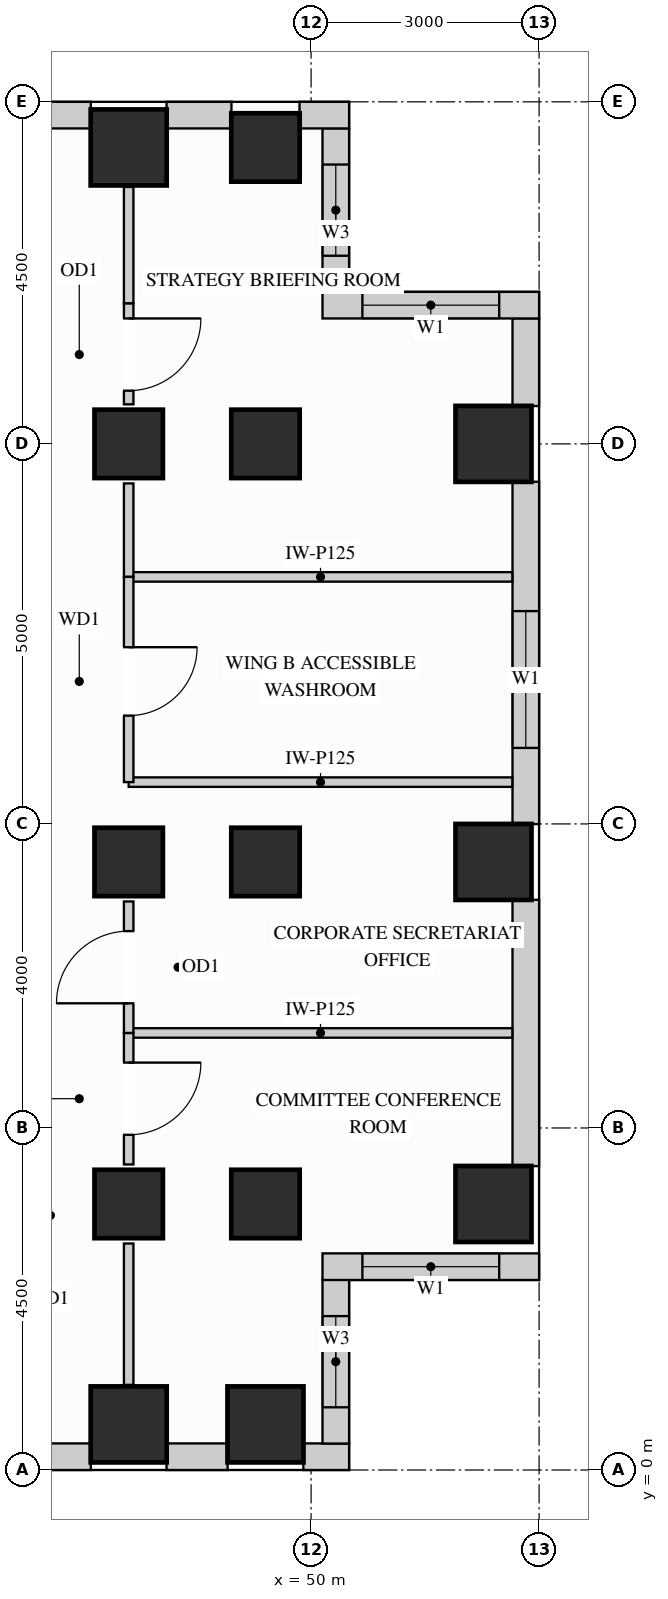
"""IFC4 building model, lengths in metres.
Left out: names, types, materials, properties, quantities, classifications, styles, units other than length and angle.
Written with IfcOpenShell. Run it as: python <this file> out.ifc"""

import sys

from ifc_helpers import new_model, si_unit, direction, frame, frame_2d, origin, origin_2d, place, context, subcontext, project, spatial, rectangle, extrude, source, transform, mapped, element, fill, save


model = new_model("IFC4")
c1 = context("Model", 3, precision=1e-05, world=origin(), true_north=direction((0.0, 1.0)))
c2 = subcontext(c1, "Body", "Model", "MODEL_VIEW")
j1 = project(units=[si_unit("LENGTHUNIT", "METRE"), si_unit("PLANEANGLEUNIT", "RADIAN")], contexts=[c1])
p1 = place(None, origin())
s1 = spatial("IfcSite", under=j1, at=p1, CompositionType="ELEMENT")
p2 = place(p1, origin())
s2 = spatial("IfcBuilding", under=s1, at=p2, CompositionType="ELEMENT")
p3 = place(p2, frame((0.0, 0.0, 153.9)))
s3 = spatial("IfcBuildingStorey", under=s2, at=p3, CompositionType="ELEMENT", Elevation=153.9)
m1 = source(origin(), c2, "Body", "SweptSolid", [
    extrude(rectangle(XDim=0.9, YDim=0.9, at=origin_2d()), origin(), (0.0, 0.0, 1.0), 3.4),
])
for number, where, z_axis, x_axis in (
    (1, (47.6, 13.5, 0.0), (0.0, 0.0, 1.0), (1.0, 0.0, 0.0)),
    (2, (47.6, 3.5, 0.0), (0.0, 0.0, 1.0), (1.0, 0.0, 0.0)),
    (3, (47.6, 8.0, 0.0), (0.0, 0.0, 1.0), (1.0, 0.0, 0.0)),
    (4, (49.4, 13.5, 0.0), (0.0, 0.0, 1.0), (1.0, 0.0, 0.0)),
    (5, (49.4, 17.4, 0.0), (0.0, 0.0, 1.0), (1.0, 0.0, 0.0)),
    (6, (49.4, 3.5, 0.0), (0.0, 0.0, 1.0), (1.0, 0.0, 0.0)),
    (7, (49.4, 8.0, 0.0), (0.0, 0.0, 1.0), (1.0, 0.0, 0.0)),
):
    element("IfcColumn", number, at=place(p3, frame(where, z_axis=z_axis, x_axis=x_axis)), inside=s3, PredefinedType="COLUMN", context=c2, shape_type="MappedRepresentation", body=[
        mapped(m1, transform((0.0, 0.0, 0.0), x_axis=(1.0, 0.0, 0.0), y_axis=(0.0, 1.0, 0.0), z_axis=(0.0, 0.0, 1.0))),
    ])
m2 = source(origin(), c2, "Body", "SweptSolid", [
    extrude(rectangle(XDim=1.0, YDim=1.0, at=origin_2d()), origin(), (0.0, 0.0, 1.0), 3.4),
])
for number, where, z_axis, x_axis in (
    (8, (47.6, 17.4, 0.0), (0.0, 0.0, 1.0), (1.0, 0.0, 0.0)),
    (9, (52.4, 13.5, 0.0), (0.0, 0.0, 1.0), (1.0, 0.0, 0.0)),
    (10, (52.4, 3.5, 0.0), (0.0, 0.0, 1.0), (1.0, 0.0, 0.0)),
    (11, (52.4, 8.0, 0.0), (0.0, 0.0, 1.0), (1.0, 0.0, 0.0)),
    (12, (47.6, 0.6, 0.0), (0.0, 0.0, 1.0), (1.0, 0.0, 0.0)),
    (13, (49.4, 0.6, 0.0), (0.0, 0.0, 1.0), (1.0, 0.0, 0.0)),
):
    element("IfcColumn", number, at=place(p3, frame(where, z_axis=z_axis, x_axis=x_axis)), inside=s3, PredefinedType="COLUMN", context=c2, shape_type="MappedRepresentation", body=[
        mapped(m2, transform((0.0, 0.0, 0.0), x_axis=(1.0, 0.0, 0.0), y_axis=(0.0, 1.0, 0.0), z_axis=(0.0, 0.0, 1.0))),
    ])
p4 = place(p3, frame((40.498, 0.175, 0.0), z_axis=(0.0, 0.0, 1.0), x_axis=(1.0, 0.0, 0.0)))
e14 = element("IfcWall", 14, at=p4, inside=s3, PredefinedType="SOLIDWALL", context=c2, shape_type="SweptSolid", body=[
    extrude(rectangle(XDim=6.604, YDim=0.35, at=frame_2d((3.302, 0.0))), origin(), (0.0, 0.0, 1.0), 2.612),
])
p5 = place(p4, frame((0.737, 0.0, 0.78)))
e15 = element("IfcOpeningElement", 15, at=p5, cuts=e14, PredefinedType="OPENING", context=c2, shape_type="SweptSolid", body=[
    extrude(rectangle(XDim=1.8, YDim=1.652, at=frame_2d((0.9, 0.826))), frame((0.0, 0.185, 0.0), z_axis=(0.0, -1.0, 0.0), x_axis=(1.0, 0.0, 0.0)), (0.0, 0.0, 1.0), 0.37),
])
p6 = place(p4, frame((2.955, 0.0, 0.78)))
e16 = element("IfcOpeningElement", 16, at=p6, cuts=e14, PredefinedType="OPENING", context=c2, shape_type="SweptSolid", body=[
    extrude(rectangle(XDim=1.8, YDim=1.652, at=frame_2d((0.9, 0.826))), frame((0.0, 0.185, 0.0), z_axis=(0.0, -1.0, 0.0), x_axis=(1.0, 0.0, 0.0)), (0.0, 0.0, 1.0), 0.37),
])
m3 = source(origin(), c2, "Body", "SweptSolid", [
    extrude(rectangle(XDim=0.804, YDim=0.35, at=frame_2d((0.402, 0.0))), origin(), (0.0, 0.0, 1.0), 3.385),
])
p7 = place(p3, frame((48.098, 0.175, 0.0), z_axis=(0.0, 0.0, 1.0), x_axis=(1.0, 0.0, 0.0)))
e17 = element("IfcWall", 17, at=p7, inside=s3, PredefinedType="SOLIDWALL", context=c2, shape_type="MappedRepresentation", body=[
    mapped(m3, transform((0.0, 0.0, 0.0), x_axis=(1.0, 0.0, 0.0), y_axis=(0.0, 1.0, 0.0), z_axis=(0.0, 0.0, 1.0))),
])
m4 = source(origin(), c2, "Body", "SweptSolid", [
    extrude(rectangle(XDim=0.602, YDim=0.35, at=frame_2d((0.301, 0.0))), origin(), (0.0, 0.0, 1.0), 3.385),
])
p8 = place(p3, frame((49.898, 0.175, 0.0), z_axis=(0.0, 0.0, 1.0), x_axis=(1.0, 0.0, 0.0)))
e18 = element("IfcWall", 18, at=p8, inside=s3, PredefinedType="SOLIDWALL", context=c2, shape_type="MappedRepresentation", body=[
    mapped(m4, transform((0.0, 0.0, 0.0), x_axis=(1.0, 0.0, 0.0), y_axis=(0.0, 1.0, 0.0), z_axis=(0.0, 0.0, 1.0))),
])
p9 = place(p3, frame((50.325, 0.348, 0.0), z_axis=(0.0, 0.0, 1.0), x_axis=(0.0, 1.0, 0.0)))
e19 = element("IfcWall", 19, at=p9, inside=s3, PredefinedType="SOLIDWALL", context=c2, shape_type="SweptSolid", body=[
    extrude(rectangle(XDim=2.154, YDim=0.35, at=frame_2d((1.077, 0.0))), origin(), (0.0, 0.0, 1.0), 3.385),
])
p10 = place(p9, frame((0.477, 0.0, 0.78)))
e20 = element("IfcOpeningElement", 20, at=p10, cuts=e19, PredefinedType="OPENING", context=c2, shape_type="SweptSolid", body=[
    extrude(rectangle(XDim=1.2, YDim=2.1, at=frame_2d((0.6, 1.05))), frame((0.0, 0.185, 0.0), z_axis=(0.0, -1.0, 0.0), x_axis=(1.0, 0.0, 0.0)), (0.0, 0.0, 1.0), 0.37),
])
p11 = place(p3, frame((50.15, 2.675, 0.0), z_axis=(0.0, 0.0, 1.0), x_axis=(1.0, 0.0, 0.0)))
e21 = element("IfcWall", 21, at=p11, inside=s3, PredefinedType="SOLIDWALL", context=c2, shape_type="SweptSolid", body=[
    extrude(rectangle(XDim=2.85, YDim=0.35, at=frame_2d((1.425, 0.0))), origin(), (0.0, 0.0, 1.0), 3.385),
])
p12 = place(p11, frame((0.525, 0.0, 0.78)))
e22 = element("IfcOpeningElement", 22, at=p12, cuts=e21, PredefinedType="OPENING", context=c2, shape_type="SweptSolid", body=[
    extrude(rectangle(XDim=1.8, YDim=2.1, at=frame_2d((0.9, 1.05))), frame((0.0, 0.185, 0.0), z_axis=(0.0, -1.0, 0.0), x_axis=(1.0, 0.0, 0.0)), (0.0, 0.0, 1.0), 0.37),
])
m5 = source(origin(), c2, "Body", "SweptSolid", [
    extrude(rectangle(XDim=3.504, YDim=0.35, at=frame_2d((1.752, 0.0))), origin(), (0.0, 0.0, 1.0), 2.612),
])
p13 = place(p3, frame((52.825, 3.998, 0.0), z_axis=(0.0, 0.0, 1.0), x_axis=(0.0, 1.0, 0.0)))
e23 = element("IfcWall", 23, at=p13, inside=s3, PredefinedType="SOLIDWALL", context=c2, shape_type="MappedRepresentation", body=[
    mapped(m5, transform((0.0, 0.0, 0.0), x_axis=(1.0, 0.0, 0.0), y_axis=(0.0, 1.0, 0.0), z_axis=(0.0, 0.0, 1.0))),
])
p14 = place(p3, frame((52.825, 8.498, 0.0), z_axis=(0.0, 0.0, 1.0), x_axis=(0.0, 1.0, 0.0)))
e24 = element("IfcWall", 24, at=p14, inside=s3, PredefinedType="SOLIDWALL", context=c2, shape_type="SweptSolid", body=[
    extrude(rectangle(XDim=4.504, YDim=0.35, at=frame_2d((2.252, 0.0))), origin(), (0.0, 0.0, 1.0), 2.612),
])
p15 = place(p14, frame((1.002, 0.0, 0.78)))
e25 = element("IfcOpeningElement", 25, at=p15, cuts=e24, PredefinedType="OPENING", context=c2, shape_type="SweptSolid", body=[
    extrude(rectangle(XDim=1.8, YDim=1.652, at=frame_2d((0.9, 0.826))), frame((0.0, 0.185, 0.0), z_axis=(0.0, -1.0, 0.0), x_axis=(1.0, 0.0, 0.0)), (0.0, 0.0, 1.0), 0.37),
])
m6 = source(origin(), c2, "Body", "SweptSolid", [
    extrude(rectangle(XDim=1.154, YDim=0.35, at=frame_2d((0.577, 0.0))), origin(), (0.0, 0.0, 1.0), 3.385),
])
p16 = place(p3, frame((52.825, 13.998, 0.0), z_axis=(0.0, 0.0, 1.0), x_axis=(0.0, 1.0, 0.0)))
e26 = element("IfcWall", 26, at=p16, inside=s3, PredefinedType="SOLIDWALL", context=c2, shape_type="MappedRepresentation", body=[
    mapped(m6, transform((0.0, 0.0, 0.0), x_axis=(1.0, 0.0, 0.0), y_axis=(0.0, 1.0, 0.0), z_axis=(0.0, 0.0, 1.0))),
])
p17 = place(p3, frame((53.0, 15.325, 0.0), z_axis=(0.0, 0.0, 1.0), x_axis=(-1.0, 0.0, 0.0)))
e27 = element("IfcWall", 27, at=p17, inside=s3, PredefinedType="SOLIDWALL", context=c2, shape_type="SweptSolid", body=[
    extrude(rectangle(XDim=2.85, YDim=0.35, at=frame_2d((1.425, 0.0))), origin(), (0.0, 0.0, 1.0), 3.385),
])
p18 = place(p17, frame((0.525, 0.0, 0.78)))
e28 = element("IfcOpeningElement", 28, at=p18, cuts=e27, PredefinedType="OPENING", context=c2, shape_type="SweptSolid", body=[
    extrude(rectangle(XDim=1.8, YDim=2.1, at=frame_2d((0.9, 1.05))), frame((0.0, 0.185, 0.0), z_axis=(0.0, -1.0, 0.0), x_axis=(1.0, 0.0, 0.0)), (0.0, 0.0, 1.0), 0.37),
])
p19 = place(p3, frame((50.325, 15.498, 0.0), z_axis=(0.0, 0.0, 1.0), x_axis=(0.0, 1.0, 0.0)))
e29 = element("IfcWall", 29, at=p19, inside=s3, PredefinedType="SOLIDWALL", context=c2, shape_type="SweptSolid", body=[
    extrude(rectangle(XDim=2.154, YDim=0.35, at=frame_2d((1.077, 0.0))), origin(), (0.0, 0.0, 1.0), 3.385),
])
p20 = place(p19, frame((0.477, 0.0, 0.78)))
e30 = element("IfcOpeningElement", 30, at=p20, cuts=e29, PredefinedType="OPENING", context=c2, shape_type="SweptSolid", body=[
    extrude(rectangle(XDim=1.2, YDim=2.1, at=frame_2d((0.6, 1.05))), frame((0.0, 0.185, 0.0), z_axis=(0.0, -1.0, 0.0), x_axis=(1.0, 0.0, 0.0)), (0.0, 0.0, 1.0), 0.37),
])
m7 = source(origin(), c2, "Body", "SweptSolid", [
    extrude(rectangle(XDim=0.652, YDim=0.35, at=frame_2d((0.326, 0.0))), origin(), (0.0, 0.0, 1.0), 3.385),
])
p21 = place(p3, frame((50.5, 17.825, 0.0), z_axis=(0.0, 0.0, 1.0), x_axis=(-1.0, 0.0, 0.0)))
e31 = element("IfcWall", 31, at=p21, inside=s3, PredefinedType="SOLIDWALL", context=c2, shape_type="MappedRepresentation", body=[
    mapped(m7, transform((0.0, 0.0, 0.0), x_axis=(1.0, 0.0, 0.0), y_axis=(0.0, 1.0, 0.0), z_axis=(0.0, 0.0, 1.0))),
])
m8 = source(origin(), c2, "Body", "SweptSolid", [
    extrude(rectangle(XDim=0.854, YDim=0.35, at=frame_2d((0.427, 0.0))), origin(), (0.0, 0.0, 1.0), 3.385),
])
p22 = place(p3, frame((48.952, 17.825, 0.0), z_axis=(0.0, 0.0, 1.0), x_axis=(-1.0, 0.0, 0.0)))
e32 = element("IfcWall", 32, at=p22, inside=s3, PredefinedType="SOLIDWALL", context=c2, shape_type="MappedRepresentation", body=[
    mapped(m8, transform((0.0, 0.0, 0.0), x_axis=(1.0, 0.0, 0.0), y_axis=(0.0, 1.0, 0.0), z_axis=(0.0, 0.0, 1.0))),
])
p23 = place(p3, frame((47.102, 17.825, 0.0), z_axis=(0.0, 0.0, 1.0), x_axis=(-1.0, 0.0, 0.0)))
e33 = element("IfcWall", 33, at=p23, inside=s3, PredefinedType="SOLIDWALL", context=c2, shape_type="SweptSolid", body=[
    extrude(rectangle(XDim=6.604, YDim=0.35, at=frame_2d((3.302, 0.0))), origin(), (0.0, 0.0, 1.0), 2.612),
])
p24 = place(p23, frame((1.849, 0.0, 0.78)))
e34 = element("IfcOpeningElement", 34, at=p24, cuts=e33, PredefinedType="OPENING", context=c2, shape_type="SweptSolid", body=[
    extrude(rectangle(XDim=1.8, YDim=1.652, at=frame_2d((0.9, 0.826))), frame((0.0, 0.185, 0.0), z_axis=(0.0, -1.0, 0.0), x_axis=(1.0, 0.0, 0.0)), (0.0, 0.0, 1.0), 0.37),
])
p25 = place(p23, frame((4.067, 0.0, 0.78)))
e35 = element("IfcOpeningElement", 35, at=p25, cuts=e33, PredefinedType="OPENING", context=c2, shape_type="SweptSolid", body=[
    extrude(rectangle(XDim=1.8, YDim=1.652, at=frame_2d((0.9, 0.826))), frame((0.0, 0.185, 0.0), z_axis=(0.0, -1.0, 0.0), x_axis=(1.0, 0.0, 0.0)), (0.0, 0.0, 1.0), 0.37),
])
m9 = source(origin(), c2, "Body", "SweptSolid", [
    extrude(rectangle(XDim=5.048, YDim=0.125, at=frame_2d((2.524, 0.0))), origin(), (0.0, 0.0, 1.0), 2.916),
])
p26 = place(p3, frame((47.6, 11.75, 0.0), z_axis=(0.0, 0.0, 1.0), x_axis=(1.0, 0.0, 0.0)))
e36 = element("IfcWall", 36, at=p26, inside=s3, PredefinedType="PARTITIONING", context=c2, shape_type="MappedRepresentation", body=[
    mapped(m9, transform((0.0, 0.0, 0.0), x_axis=(1.0, 0.0, 0.0), y_axis=(0.0, 1.0, 0.0), z_axis=(0.0, 0.0, 1.0))),
])
m10 = source(origin(), c2, "Body", "SweptSolid", [
    extrude(rectangle(XDim=5.048, YDim=0.125, at=frame_2d((2.524, 0.0))), origin(), (0.0, 0.0, 1.0), 3.385),
])
for number, where, z_axis, x_axis in (
    (37, (47.6, 5.75, 0.0), (0.0, 0.0, 1.0), (1.0, 0.0, 0.0)),
    (38, (47.6, 9.05, 0.0), (0.0, 0.0, 1.0), (1.0, 0.0, 0.0)),
):
    element("IfcWall", number, at=place(p3, frame(where, z_axis=z_axis, x_axis=x_axis)), inside=s3, PredefinedType="PARTITIONING", context=c2, shape_type="MappedRepresentation", body=[
        mapped(m10, transform((0.0, 0.0, 0.0), x_axis=(1.0, 0.0, 0.0), y_axis=(0.0, 1.0, 0.0), z_axis=(0.0, 0.0, 1.0))),
    ])
p27 = place(p3, frame((47.6, 4.02, 0.0), z_axis=(0.0, 0.0, 1.0), x_axis=(0.0, 1.0, 0.0)))
e39 = element("IfcWall", 39, at=p27, inside=s3, PredefinedType="PARTITIONING", context=c2, shape_type="SweptSolid", body=[
    extrude(rectangle(XDim=1.73, YDim=0.125, at=frame_2d((0.865, 0.0))), origin(), (0.0, 0.0, 1.0), 2.773),
])
p28 = place(p27, frame((0.39, 0.0, 0.0)))
e40 = element("IfcOpeningElement", 40, at=p28, cuts=e39, PredefinedType="OPENING", context=c2, shape_type="SweptSolid", body=[
    extrude(rectangle(XDim=0.95, YDim=2.15, at=frame_2d((0.475, 1.075))), frame((0.0, 0.073, 0.0), z_axis=(0.0, -1.0, 0.0), x_axis=(1.0, 0.0, 0.0)), (0.0, 0.0, 1.0), 0.145),
])
m11 = source(origin(), c2, "Body", "SweptSolid", [
    extrude(rectangle(XDim=1.86, YDim=0.125, at=frame_2d((0.93, 0.0))), origin(), (0.0, 0.0, 1.0), 2.773),
])
p29 = place(p3, frame((47.6, 1.12, 0.0), z_axis=(0.0, 0.0, 1.0), x_axis=(0.0, 1.0, 0.0)))
e41 = element("IfcWall", 41, at=p29, inside=s3, PredefinedType="PARTITIONING", context=c2, shape_type="MappedRepresentation", body=[
    mapped(m11, transform((0.0, 0.0, 0.0), x_axis=(1.0, 0.0, 0.0), y_axis=(0.0, 1.0, 0.0), z_axis=(0.0, 0.0, 1.0))),
])
p30 = place(p3, frame((47.6, 5.75, 0.0), z_axis=(0.0, 0.0, 1.0), x_axis=(0.0, 1.0, 0.0)))
e42 = element("IfcWall", 42, at=p30, inside=s3, PredefinedType="PARTITIONING", context=c2, shape_type="SweptSolid", body=[
    extrude(rectangle(XDim=1.73, YDim=0.125, at=frame_2d((0.865, 0.0))), origin(), (0.0, 0.0, 1.0), 2.773),
])
p31 = place(p30, frame((0.39, 0.0, 0.0)))
e43 = element("IfcOpeningElement", 43, at=p31, cuts=e42, PredefinedType="OPENING", context=c2, shape_type="SweptSolid", body=[
    extrude(rectangle(XDim=0.95, YDim=2.15, at=frame_2d((0.475, 1.075))), frame((0.0, 0.073, 0.0), z_axis=(0.0, -1.0, 0.0), x_axis=(1.0, 0.0, 0.0)), (0.0, 0.0, 1.0), 0.145),
])
m12 = source(origin(), c2, "Body", "SweptSolid", [
    extrude(rectangle(XDim=1.23, YDim=0.125, at=frame_2d((0.615, 0.0))), origin(), (0.0, 0.0, 1.0), 2.773),
])
p32 = place(p3, frame((47.6, 11.75, 0.0), z_axis=(0.0, 0.0, 1.0), x_axis=(0.0, 1.0, 0.0)))
e44 = element("IfcWall", 44, at=p32, inside=s3, PredefinedType="PARTITIONING", context=c2, shape_type="MappedRepresentation", body=[
    mapped(m12, transform((0.0, 0.0, 0.0), x_axis=(1.0, 0.0, 0.0), y_axis=(0.0, 1.0, 0.0), z_axis=(0.0, 0.0, 1.0))),
])
p33 = place(p3, frame((47.6, 14.02, 0.0), z_axis=(0.0, 0.0, 1.0), x_axis=(0.0, 1.0, 0.0)))
e45 = element("IfcWall", 45, at=p33, inside=s3, PredefinedType="PARTITIONING", context=c2, shape_type="SweptSolid", body=[
    extrude(rectangle(XDim=1.33, YDim=0.125, at=frame_2d((0.665, 0.0))), origin(), (0.0, 0.0, 1.0), 2.773),
])
p34 = place(p33, frame((0.18, 0.0, 0.0)))
e46 = element("IfcOpeningElement", 46, at=p34, cuts=e45, PredefinedType="OPENING", context=c2, shape_type="SweptSolid", body=[
    extrude(rectangle(XDim=0.95, YDim=2.15, at=frame_2d((0.475, 1.075))), frame((0.0, 0.073, 0.0), z_axis=(0.0, -1.0, 0.0), x_axis=(1.0, 0.0, 0.0)), (0.0, 0.0, 1.0), 0.145),
])
m13 = source(origin(), c2, "Body", "SweptSolid", [
    extrude(rectangle(XDim=1.53, YDim=0.125, at=frame_2d((0.765, 0.0))), origin(), (0.0, 0.0, 1.0), 2.773),
])
p35 = place(p3, frame((47.6, 15.35, 0.0), z_axis=(0.0, 0.0, 1.0), x_axis=(0.0, 1.0, 0.0)))
e47 = element("IfcWall", 47, at=p35, inside=s3, PredefinedType="PARTITIONING", context=c2, shape_type="MappedRepresentation", body=[
    mapped(m13, transform((0.0, 0.0, 0.0), x_axis=(1.0, 0.0, 0.0), y_axis=(0.0, 1.0, 0.0), z_axis=(0.0, 0.0, 1.0))),
])
p36 = place(p3, frame((47.6, 9.05, 0.0), z_axis=(0.0, 0.0, 1.0), x_axis=(0.0, 1.0, 0.0)))
e48 = element("IfcWall", 48, at=p36, inside=s3, PredefinedType="PARTITIONING", context=c2, shape_type="SweptSolid", body=[
    extrude(rectangle(XDim=2.7, YDim=0.125, at=frame_2d((1.35, 0.0))), origin(), (0.0, 0.0, 1.0), 2.773),
])
p37 = place(p36, frame((0.875, 0.0, 0.0)))
e49 = element("IfcOpeningElement", 49, at=p37, cuts=e48, PredefinedType="OPENING", context=c2, shape_type="SweptSolid", body=[
    extrude(rectangle(XDim=0.9, YDim=2.15, at=frame_2d((0.45, 1.075))), frame((0.0, 0.073, 0.0), z_axis=(0.0, -1.0, 0.0), x_axis=(1.0, 0.0, 0.0)), (0.0, 0.0, 1.0), 0.145),
])
m14 = source(origin(), c2, "Body", "SweptSolid", [
    extrude(rectangle(XDim=0.95, YDim=2.15, at=frame_2d((0.475, 1.075))), frame((0.0, 0.025, 0.0), z_axis=(0.0, -1.0, 0.0), x_axis=(1.0, 0.0, 0.0)), (0.0, 0.0, 1.0), 0.05),
])
p38 = place(p28, origin())
e50 = element("IfcDoor", 50, at=p38, inside=s3, OperationType="SINGLE_SWING_RIGHT", PredefinedType="DOOR", context=c2, shape_type="MappedRepresentation", body=[
    mapped(m14, transform((0.0, 0.0, 0.0), x_axis=(1.0, 0.0, 0.0), y_axis=(0.0, 1.0, 0.0), z_axis=(0.0, 0.0, 1.0))),
])
fill(e40, e50)
p39 = place(p31, origin())
e51 = element("IfcDoor", 51, at=p39, inside=s3, OperationType="SINGLE_SWING_LEFT", PredefinedType="DOOR", context=c2, shape_type="MappedRepresentation", body=[
    mapped(m14, transform((0.0, 0.0, 0.0), x_axis=(1.0, 0.0, 0.0), y_axis=(0.0, 1.0, 0.0), z_axis=(0.0, 0.0, 1.0))),
])
fill(e43, e51)
p40 = place(p34, origin())
e52 = element("IfcDoor", 52, at=p40, inside=s3, OperationType="SINGLE_SWING_RIGHT", PredefinedType="DOOR", context=c2, shape_type="MappedRepresentation", body=[
    mapped(m14, transform((0.0, 0.0, 0.0), x_axis=(1.0, 0.0, 0.0), y_axis=(0.0, 1.0, 0.0), z_axis=(0.0, 0.0, 1.0))),
])
fill(e46, e52)
m15 = source(origin(), c2, "Body", "SweptSolid", [
    extrude(rectangle(XDim=0.9, YDim=2.15, at=frame_2d((0.45, 1.075))), frame((0.0, 0.025, 0.0), z_axis=(0.0, -1.0, 0.0), x_axis=(1.0, 0.0, 0.0)), (0.0, 0.0, 1.0), 0.05),
])
p41 = place(p37, origin())
e53 = element("IfcDoor", 53, at=p41, inside=s3, OperationType="SINGLE_SWING_RIGHT", PredefinedType="DOOR", context=c2, shape_type="MappedRepresentation", body=[
    mapped(m15, transform((0.0, 0.0, 0.0), x_axis=(1.0, 0.0, 0.0), y_axis=(0.0, 1.0, 0.0), z_axis=(0.0, 0.0, 1.0))),
])
fill(e49, e53)
m16 = source(origin(), c2, "Body", "SweptSolid", [
    extrude(rectangle(XDim=1.8, YDim=2.1, at=frame_2d((0.9, 1.05))), frame((0.0, 0.03, 0.0), z_axis=(0.0, -1.0, 0.0), x_axis=(1.0, 0.0, 0.0)), (0.0, 0.0, 1.0), 0.06),
])
p42 = place(p12, origin())
e54 = element("IfcWindow", 54, at=p42, inside=s3, PartitioningType="SINGLE_PANEL", PredefinedType="WINDOW", context=c2, shape_type="MappedRepresentation", body=[
    mapped(m16, transform((0.0, 0.0, 0.0), x_axis=(1.0, 0.0, 0.0), y_axis=(0.0, 1.0, 0.0), z_axis=(0.0, 0.0, 1.0))),
])
fill(e22, e54)
m17 = source(origin(), c2, "Body", "SweptSolid", [
    extrude(rectangle(XDim=1.8, YDim=1.652, at=frame_2d((0.9, 0.826))), frame((0.0, 0.03, 0.0), z_axis=(0.0, -1.0, 0.0), x_axis=(1.0, 0.0, 0.0)), (0.0, 0.0, 1.0), 0.06),
])
p43 = place(p15, origin())
e55 = element("IfcWindow", 55, at=p43, inside=s3, PartitioningType="SINGLE_PANEL", PredefinedType="WINDOW", context=c2, shape_type="MappedRepresentation", body=[
    mapped(m17, transform((0.0, 0.0, 0.0), x_axis=(1.0, 0.0, 0.0), y_axis=(0.0, 1.0, 0.0), z_axis=(0.0, 0.0, 1.0))),
])
fill(e25, e55)
p44 = place(p18, origin())
e56 = element("IfcWindow", 56, at=p44, inside=s3, PartitioningType="SINGLE_PANEL", PredefinedType="WINDOW", context=c2, shape_type="MappedRepresentation", body=[
    mapped(m16, transform((0.0, 0.0, 0.0), x_axis=(1.0, 0.0, 0.0), y_axis=(0.0, 1.0, 0.0), z_axis=(0.0, 0.0, 1.0))),
])
fill(e28, e56)
m18 = source(origin(), c2, "Body", "SweptSolid", [
    extrude(rectangle(XDim=1.2, YDim=2.1, at=frame_2d((0.6, 1.05))), frame((0.0, 0.03, 0.0), z_axis=(0.0, -1.0, 0.0), x_axis=(1.0, 0.0, 0.0)), (0.0, 0.0, 1.0), 0.06),
])
p45 = place(p10, origin())
e57 = element("IfcWindow", 57, at=p45, inside=s3, PartitioningType="SINGLE_PANEL", PredefinedType="WINDOW", context=c2, shape_type="MappedRepresentation", body=[
    mapped(m18, transform((0.0, 0.0, 0.0), x_axis=(1.0, 0.0, 0.0), y_axis=(0.0, 1.0, 0.0), z_axis=(0.0, 0.0, 1.0))),
])
fill(e20, e57)
p46 = place(p20, origin())
e58 = element("IfcWindow", 58, at=p46, inside=s3, PartitioningType="SINGLE_PANEL", PredefinedType="WINDOW", context=c2, shape_type="MappedRepresentation", body=[
    mapped(m18, transform((0.0, 0.0, 0.0), x_axis=(1.0, 0.0, 0.0), y_axis=(0.0, 1.0, 0.0), z_axis=(0.0, 0.0, 1.0))),
])
fill(e30, e58)
save(model, sys.argv[1])
